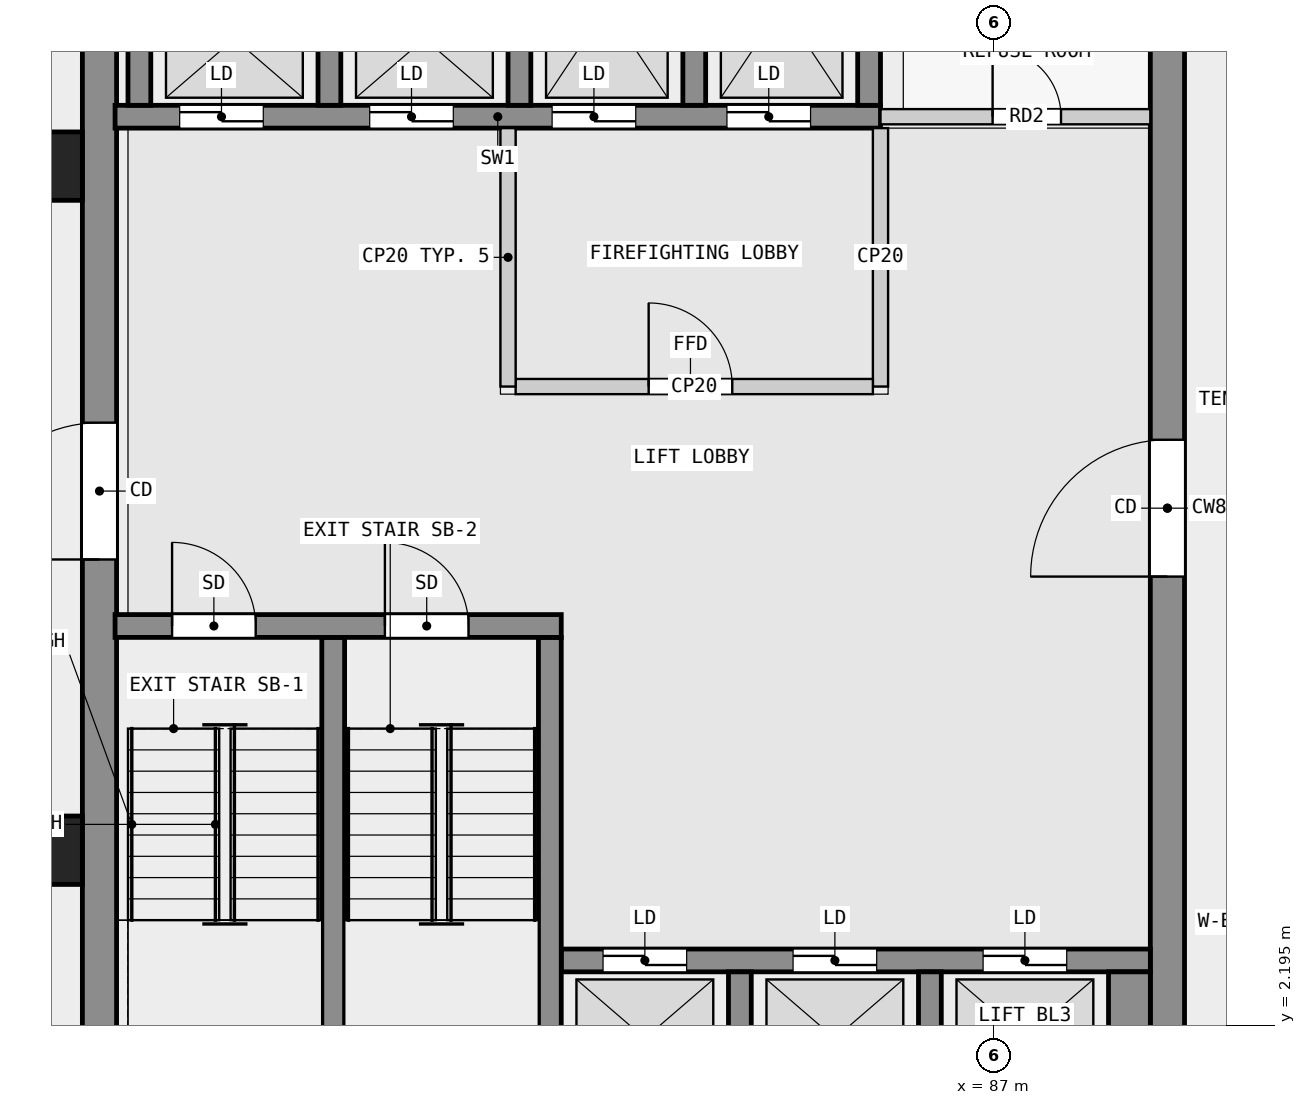
"""IFC4 building model, lengths in metres.
Left out: names, types, materials, properties, quantities, classifications, styles, units other than length and angle.
Written with IfcOpenShell. Run it as: python <this file> out.ifc"""

import sys

from ifc_helpers import new_model, si_unit, direction, frame, frame_2d, origin, origin_2d, place, context, subcontext, project, spatial, rectangle, extrude, element, fill, save


model = new_model("IFC4")
c1 = context("Model", 3, precision=1e-05, world=origin(), true_north=direction((0.0, 1.0)))
c2 = subcontext(c1, "Body", "Model", "MODEL_VIEW")
j1 = project(units=[si_unit("LENGTHUNIT", "METRE"), si_unit("PLANEANGLEUNIT", "RADIAN")], contexts=[c1])
p1 = place(None, origin())
s1 = spatial("IfcSite", under=j1, at=p1, CompositionType="ELEMENT")
p2 = place(p1, origin())
s2 = spatial("IfcBuilding", under=s1, at=p2, CompositionType="ELEMENT")
p3 = place(p2, frame((0.0, 0.0, 88.8)))
s3 = spatial("IfcBuildingStorey", under=s2, at=p3, CompositionType="ELEMENT", Elevation=88.8)
for number, where, z_axis, x_axis in (
    (1, (74.55, 13.5, 0.0), (0.0, 0.0, 1.0), (1.0, 0.0, 0.0)),
    (2, (74.55, 4.5, 0.0), (0.0, 0.0, 1.0), (1.0, 0.0, 0.0)),
):
    element("IfcColumn", number, at=place(p3, frame(where, z_axis=z_axis, x_axis=x_axis)), inside=s3, PredefinedType="COLUMN", context=c2, shape_type="SweptSolid", body=[
        extrude(rectangle(XDim=0.9, YDim=0.9, at=origin_2d()), origin(), (0.0, 0.0, 1.0), 3.5),
    ])
p4 = place(p3, frame((75.225, 0.45, 0.0), z_axis=(0.0, 0.0, 1.0), x_axis=(0.0, 1.0, 0.0)))
e3 = element("IfcWall", 3, at=p4, inside=s3, PredefinedType="SHEAR", context=c2, shape_type="SweptSolid", body=[
    extrude(rectangle(XDim=17.1, YDim=0.45, at=frame_2d((8.55, 0.0))), origin(), (0.0, 0.0, 1.0), 3.25),
])
p5 = place(p4, frame((7.875, 0.0, 0.0)))
e4 = element("IfcOpeningElement", 4, at=p5, cuts=e3, PredefinedType="OPENING", context=c2, shape_type="SweptSolid", body=[
    extrude(rectangle(XDim=1.8, YDim=2.1, at=frame_2d((0.9, 1.05))), frame((0.0, 0.235, 0.0), z_axis=(0.0, -1.0, 0.0), x_axis=(1.0, 0.0, 0.0)), (0.0, 0.0, 1.0), 0.47),
])
p6 = place(p3, frame((89.275, 0.45, 0.0), z_axis=(0.0, 0.0, 1.0), x_axis=(0.0, 1.0, 0.0)))
e5 = element("IfcWall", 5, at=p6, inside=s3, PredefinedType="SHEAR", context=c2, shape_type="SweptSolid", body=[
    extrude(rectangle(XDim=17.1, YDim=0.45, at=frame_2d((8.55, 0.0))), origin(), (0.0, 0.0, 1.0), 3.25),
])
p7 = place(p6, frame((7.65, 0.0, 0.0)))
e6 = element("IfcOpeningElement", 6, at=p7, cuts=e5, PredefinedType="OPENING", context=c2, shape_type="SweptSolid", body=[
    extrude(rectangle(XDim=1.8, YDim=2.1, at=frame_2d((0.9, 1.05))), frame((0.0, 0.235, 0.0), z_axis=(0.0, -1.0, 0.0), x_axis=(1.0, 0.0, 0.0)), (0.0, 0.0, 1.0), 0.47),
])
p8 = place(p6, frame((15.85, 0.0, 0.0)))
e7 = element("IfcOpeningElement", 7, at=p8, cuts=e5, PredefinedType="OPENING", context=c2, shape_type="SweptSolid", body=[
    extrude(rectangle(XDim=0.9, YDim=2.1, at=frame_2d((0.45, 1.05))), frame((0.0, 0.235, 0.0), z_axis=(0.0, -1.0, 0.0), x_axis=(1.0, 0.0, 0.0)), (0.0, 0.0, 1.0), 0.47),
])
p9 = place(p3, frame((75.43, 7.45, 0.0), z_axis=(0.0, 0.0, 1.0), x_axis=(1.0, 0.0, 0.0)))
e8 = element("IfcWall", 8, at=p9, inside=s3, PredefinedType="SHEAR", context=c2, shape_type="SweptSolid", body=[
    extrude(rectangle(XDim=5.87, YDim=0.3, at=frame_2d((2.935, 0.0))), origin(), (0.0, 0.0, 1.0), 3.25),
])
p10 = place(p9, frame((0.75, 0.0, 0.0)))
e9 = element("IfcOpeningElement", 9, at=p10, cuts=e8, PredefinedType="OPENING", context=c2, shape_type="SweptSolid", body=[
    extrude(rectangle(XDim=1.1, YDim=2.1, at=frame_2d((0.55, 1.05))), frame((0.0, 0.16, 0.0), z_axis=(0.0, -1.0, 0.0), x_axis=(1.0, 0.0, 0.0)), (0.0, 0.0, 1.0), 0.32),
])
p11 = place(p9, frame((3.55, 0.0, 0.0)))
e10 = element("IfcOpeningElement", 10, at=p11, cuts=e8, PredefinedType="OPENING", context=c2, shape_type="SweptSolid", body=[
    extrude(rectangle(XDim=1.1, YDim=2.1, at=frame_2d((0.55, 1.05))), frame((0.0, 0.16, 0.0), z_axis=(0.0, -1.0, 0.0), x_axis=(1.0, 0.0, 0.0)), (0.0, 0.0, 1.0), 0.32),
])
for number, where, z_axis, x_axis in (
    (11, (78.3, 0.9, 0.0), (0.0, 0.0, 1.0), (0.0, 1.0, 0.0)),
    (12, (81.15, 0.9, 0.0), (0.0, 0.0, 1.0), (0.0, 1.0, 0.0)),
):
    element("IfcWall", number, at=place(p3, frame(where, z_axis=z_axis, x_axis=x_axis)), inside=s3, PredefinedType="SHEAR", context=c2, shape_type="SweptSolid", body=[
        extrude(rectangle(XDim=6.4, YDim=0.3, at=frame_2d((3.2, 0.0))), origin(), (0.0, 0.0, 1.0), 3.25),
    ])
for number, where, z_axis, x_axis in (
    (13, (83.65, 0.9, 0.0), (0.0, 0.0, 1.0), (0.0, 1.0, 0.0)),
    (14, (86.15, 0.9, 0.0), (0.0, 0.0, 1.0), (0.0, 1.0, 0.0)),
):
    element("IfcWall", number, at=place(p3, frame(where, z_axis=z_axis, x_axis=x_axis)), inside=s3, PredefinedType="SHEAR", context=c2, shape_type="SweptSolid", body=[
        extrude(rectangle(XDim=2.0, YDim=0.3, at=frame_2d((1.0, 0.0))), origin(), (0.0, 0.0, 1.0), 3.25),
    ])
p12 = place(p3, frame((88.775, 0.9, 0.0), z_axis=(0.0, 0.0, 1.0), x_axis=(0.0, 1.0, 0.0)))
e15 = element("IfcWall", 15, at=p12, inside=s3, PredefinedType="SHEAR", context=c2, shape_type="SweptSolid", body=[
    extrude(rectangle(XDim=2.0, YDim=0.55, at=frame_2d((1.0, 0.0))), origin(), (0.0, 0.0, 1.0), 3.25),
])
p13 = place(p3, frame((81.3, 3.05, 0.0), z_axis=(0.0, 0.0, 1.0), x_axis=(1.0, 0.0, 0.0)))
e16 = element("IfcWall", 16, at=p13, inside=s3, PredefinedType="SHEAR", context=c2, shape_type="SweptSolid", body=[
    extrude(rectangle(XDim=7.75, YDim=0.3, at=frame_2d((3.875, 0.0))), origin(), (0.0, 0.0, 1.0), 3.25),
])
p14 = place(p13, frame((0.55, 0.0, 0.0)))
e17 = element("IfcOpeningElement", 17, at=p14, cuts=e16, PredefinedType="OPENING", context=c2, shape_type="SweptSolid", body=[
    extrude(rectangle(XDim=1.1, YDim=2.1, at=frame_2d((0.55, 1.05))), frame((0.0, 0.16, 0.0), z_axis=(0.0, -1.0, 0.0), x_axis=(1.0, 0.0, 0.0)), (0.0, 0.0, 1.0), 0.32),
])
p15 = place(p13, frame((3.05, 0.0, 0.0)))
e18 = element("IfcOpeningElement", 18, at=p15, cuts=e16, PredefinedType="OPENING", context=c2, shape_type="SweptSolid", body=[
    extrude(rectangle(XDim=1.1, YDim=2.1, at=frame_2d((0.55, 1.05))), frame((0.0, 0.16, 0.0), z_axis=(0.0, -1.0, 0.0), x_axis=(1.0, 0.0, 0.0)), (0.0, 0.0, 1.0), 0.32),
])
p16 = place(p13, frame((5.55, 0.0, 0.0)))
e19 = element("IfcOpeningElement", 19, at=p16, cuts=e16, PredefinedType="OPENING", context=c2, shape_type="SweptSolid", body=[
    extrude(rectangle(XDim=1.1, YDim=2.1, at=frame_2d((0.55, 1.05))), frame((0.0, 0.16, 0.0), z_axis=(0.0, -1.0, 0.0), x_axis=(1.0, 0.0, 0.0)), (0.0, 0.0, 1.0), 0.32),
])
p17 = place(p3, frame((75.43, 14.15, 0.0), z_axis=(0.0, 0.0, 1.0), x_axis=(1.0, 0.0, 0.0)))
e20 = element("IfcWall", 20, at=p17, inside=s3, PredefinedType="SHEAR", context=c2, shape_type="SweptSolid", body=[
    extrude(rectangle(XDim=10.07, YDim=0.3, at=frame_2d((5.035, 0.0))), origin(), (0.0, 0.0, 1.0), 3.25),
])
p18 = place(p17, frame((0.85, 0.0, 0.0)))
e21 = element("IfcOpeningElement", 21, at=p18, cuts=e20, PredefinedType="OPENING", context=c2, shape_type="SweptSolid", body=[
    extrude(rectangle(XDim=1.1, YDim=2.1, at=frame_2d((0.55, 1.05))), frame((0.0, 0.16, 0.0), z_axis=(0.0, -1.0, 0.0), x_axis=(1.0, 0.0, 0.0)), (0.0, 0.0, 1.0), 0.32),
])
p19 = place(p17, frame((3.35, 0.0, 0.0)))
e22 = element("IfcOpeningElement", 22, at=p19, cuts=e20, PredefinedType="OPENING", context=c2, shape_type="SweptSolid", body=[
    extrude(rectangle(XDim=1.1, YDim=2.1, at=frame_2d((0.55, 1.05))), frame((0.0, 0.16, 0.0), z_axis=(0.0, -1.0, 0.0), x_axis=(1.0, 0.0, 0.0)), (0.0, 0.0, 1.0), 0.32),
])
p20 = place(p17, frame((5.75, 0.0, 0.0)))
e23 = element("IfcOpeningElement", 23, at=p20, cuts=e20, PredefinedType="OPENING", context=c2, shape_type="SweptSolid", body=[
    extrude(rectangle(XDim=1.1, YDim=2.1, at=frame_2d((0.55, 1.05))), frame((0.0, 0.16, 0.0), z_axis=(0.0, -1.0, 0.0), x_axis=(1.0, 0.0, 0.0)), (0.0, 0.0, 1.0), 0.32),
])
p21 = place(p17, frame((8.05, 0.0, 0.0)))
e24 = element("IfcOpeningElement", 24, at=p21, cuts=e20, PredefinedType="OPENING", context=c2, shape_type="SweptSolid", body=[
    extrude(rectangle(XDim=1.1, YDim=2.1, at=frame_2d((0.55, 1.05))), frame((0.0, 0.16, 0.0), z_axis=(0.0, -1.0, 0.0), x_axis=(1.0, 0.0, 0.0)), (0.0, 0.0, 1.0), 0.32),
])
for number, where, z_axis, x_axis in (
    (25, (75.75, 14.3, 0.0), (0.0, 0.0, 1.0), (0.0, 1.0, 0.0)),
    (26, (78.25, 14.3, 0.0), (0.0, 0.0, 1.0), (0.0, 1.0, 0.0)),
    (27, (80.75, 14.3, 0.0), (0.0, 0.0, 1.0), (0.0, 1.0, 0.0)),
    (28, (83.05, 14.3, 0.0), (0.0, 0.0, 1.0), (0.0, 1.0, 0.0)),
    (29, (85.35, 14.3, 0.0), (0.0, 0.0, 1.0), (0.0, 1.0, 0.0)),
):
    element("IfcWall", number, at=place(p3, frame(where, z_axis=z_axis, x_axis=x_axis)), inside=s3, PredefinedType="SHEAR", context=c2, shape_type="SweptSolid", body=[
        extrude(rectangle(XDim=2.8, YDim=0.3, at=frame_2d((1.4, 0.0))), origin(), (0.0, 0.0, 1.0), 3.25),
    ])
p22 = place(p3, frame((80.6, 10.6, 0.0), z_axis=(0.0, 0.0, 1.0), x_axis=(0.0, 1.0, 0.0)))
e30 = element("IfcWall", 30, at=p22, inside=s3, PredefinedType="PARTITIONING", context=c2, shape_type="SweptSolid", body=[
    extrude(rectangle(XDim=3.4, YDim=0.2, at=frame_2d((1.7, 0.0))), origin(), (0.0, 0.0, 1.0), 3.25),
])
p23 = place(p3, frame((80.7, 10.6, 0.0), z_axis=(0.0, 0.0, 1.0), x_axis=(1.0, 0.0, 0.0)))
e31 = element("IfcWall", 31, at=p23, inside=s3, PredefinedType="PARTITIONING", context=c2, shape_type="SweptSolid", body=[
    extrude(rectangle(XDim=4.7, YDim=0.2, at=frame_2d((2.35, 0.0))), origin(), (0.0, 0.0, 1.0), 3.25),
])
p24 = place(p23, frame((1.75, 0.0, 0.0)))
e32 = element("IfcOpeningElement", 32, at=p24, cuts=e31, PredefinedType="OPENING", context=c2, shape_type="SweptSolid", body=[
    extrude(rectangle(XDim=1.1, YDim=2.1, at=frame_2d((0.55, 1.05))), frame((0.0, 0.11, 0.0), z_axis=(0.0, -1.0, 0.0), x_axis=(1.0, 0.0, 0.0)), (0.0, 0.0, 1.0), 0.22),
])
p25 = place(p3, frame((85.5, 10.6, 0.0), z_axis=(0.0, 0.0, 1.0), x_axis=(0.0, 1.0, 0.0)))
e33 = element("IfcWall", 33, at=p25, inside=s3, PredefinedType="PARTITIONING", context=c2, shape_type="SweptSolid", body=[
    extrude(rectangle(XDim=3.4, YDim=0.2, at=frame_2d((1.7, 0.0))), origin(), (0.0, 0.0, 1.0), 3.25),
])
p26 = place(p3, frame((85.5, 14.15, 0.0), z_axis=(0.0, 0.0, 1.0), x_axis=(1.0, 0.0, 0.0)))
e34 = element("IfcWall", 34, at=p26, inside=s3, PredefinedType="PARTITIONING", context=c2, shape_type="SweptSolid", body=[
    extrude(rectangle(XDim=3.55, YDim=0.2, at=frame_2d((1.775, 0.0))), origin(), (0.0, 0.0, 1.0), 3.25),
])
p27 = place(p26, frame((1.475, 0.0, 0.0)))
e35 = element("IfcOpeningElement", 35, at=p27, cuts=e34, PredefinedType="OPENING", context=c2, shape_type="SweptSolid", body=[
    extrude(rectangle(XDim=0.9, YDim=2.1, at=frame_2d((0.45, 1.05))), frame((0.0, 0.11, 0.0), z_axis=(0.0, -1.0, 0.0), x_axis=(1.0, 0.0, 0.0)), (0.0, 0.0, 1.0), 0.22),
])
p28 = place(p24, origin())
e36 = element("IfcDoor", 36, at=p28, inside=s3, OperationType="SINGLE_SWING_LEFT", PredefinedType="DOOR", context=c2, shape_type="SweptSolid", body=[
    extrude(rectangle(XDim=1.1, YDim=2.1, at=frame_2d((0.55, 1.05))), frame((0.0, 0.025, 0.0), z_axis=(0.0, -1.0, 0.0), x_axis=(1.0, 0.0, 0.0)), (0.0, 0.0, 1.0), 0.05),
])
fill(e32, e36)
p29 = place(p14, origin())
e37 = element("IfcDoor", 37, at=p29, inside=s3, OperationType="DOUBLE_DOOR_SLIDING", PredefinedType="DOOR", context=c2, shape_type="SweptSolid", body=[
    extrude(rectangle(XDim=1.1, YDim=2.1, at=frame_2d((0.55, 1.05))), frame((0.0, 0.025, 0.0), z_axis=(0.0, -1.0, 0.0), x_axis=(1.0, 0.0, 0.0)), (0.0, 0.0, 1.0), 0.05),
])
fill(e17, e37)
p30 = place(p15, origin())
e38 = element("IfcDoor", 38, at=p30, inside=s3, OperationType="DOUBLE_DOOR_SLIDING", PredefinedType="DOOR", context=c2, shape_type="SweptSolid", body=[
    extrude(rectangle(XDim=1.1, YDim=2.1, at=frame_2d((0.55, 1.05))), frame((0.0, 0.025, 0.0), z_axis=(0.0, -1.0, 0.0), x_axis=(1.0, 0.0, 0.0)), (0.0, 0.0, 1.0), 0.05),
])
fill(e18, e38)
p31 = place(p16, origin())
e39 = element("IfcDoor", 39, at=p31, inside=s3, OperationType="DOUBLE_DOOR_SLIDING", PredefinedType="DOOR", context=c2, shape_type="SweptSolid", body=[
    extrude(rectangle(XDim=1.1, YDim=2.1, at=frame_2d((0.55, 1.05))), frame((0.0, 0.025, 0.0), z_axis=(0.0, -1.0, 0.0), x_axis=(1.0, 0.0, 0.0)), (0.0, 0.0, 1.0), 0.05),
])
fill(e19, e39)
p32 = place(p18, origin())
e40 = element("IfcDoor", 40, at=p32, inside=s3, OperationType="DOUBLE_DOOR_SLIDING", PredefinedType="DOOR", context=c2, shape_type="SweptSolid", body=[
    extrude(rectangle(XDim=1.1, YDim=2.1, at=frame_2d((0.55, 1.05))), frame((0.0, 0.025, 0.0), z_axis=(0.0, -1.0, 0.0), x_axis=(1.0, 0.0, 0.0)), (0.0, 0.0, 1.0), 0.05),
])
fill(e21, e40)
p33 = place(p19, origin())
e41 = element("IfcDoor", 41, at=p33, inside=s3, OperationType="DOUBLE_DOOR_SLIDING", PredefinedType="DOOR", context=c2, shape_type="SweptSolid", body=[
    extrude(rectangle(XDim=1.1, YDim=2.1, at=frame_2d((0.55, 1.05))), frame((0.0, 0.025, 0.0), z_axis=(0.0, -1.0, 0.0), x_axis=(1.0, 0.0, 0.0)), (0.0, 0.0, 1.0), 0.05),
])
fill(e22, e41)
p34 = place(p20, origin())
e42 = element("IfcDoor", 42, at=p34, inside=s3, OperationType="DOUBLE_DOOR_SLIDING", PredefinedType="DOOR", context=c2, shape_type="SweptSolid", body=[
    extrude(rectangle(XDim=1.1, YDim=2.1, at=frame_2d((0.55, 1.05))), frame((0.0, 0.025, 0.0), z_axis=(0.0, -1.0, 0.0), x_axis=(1.0, 0.0, 0.0)), (0.0, 0.0, 1.0), 0.05),
])
fill(e23, e42)
p35 = place(p21, origin())
e43 = element("IfcDoor", 43, at=p35, inside=s3, OperationType="DOUBLE_DOOR_SLIDING", PredefinedType="DOOR", context=c2, shape_type="SweptSolid", body=[
    extrude(rectangle(XDim=1.1, YDim=2.1, at=frame_2d((0.55, 1.05))), frame((0.0, 0.025, 0.0), z_axis=(0.0, -1.0, 0.0), x_axis=(1.0, 0.0, 0.0)), (0.0, 0.0, 1.0), 0.05),
])
fill(e24, e43)
p36 = place(p10, origin())
e44 = element("IfcDoor", 44, at=p36, inside=s3, OperationType="SINGLE_SWING_RIGHT", PredefinedType="DOOR", context=c2, shape_type="SweptSolid", body=[
    extrude(rectangle(XDim=1.1, YDim=2.1, at=frame_2d((0.55, 1.05))), frame((0.0, 0.025, 0.0), z_axis=(0.0, -1.0, 0.0), x_axis=(1.0, 0.0, 0.0)), (0.0, 0.0, 1.0), 0.05),
])
fill(e9, e44)
p37 = place(p11, origin())
e45 = element("IfcDoor", 45, at=p37, inside=s3, OperationType="SINGLE_SWING_LEFT", PredefinedType="DOOR", context=c2, shape_type="SweptSolid", body=[
    extrude(rectangle(XDim=1.1, YDim=2.1, at=frame_2d((0.55, 1.05))), frame((0.0, 0.025, 0.0), z_axis=(0.0, -1.0, 0.0), x_axis=(1.0, 0.0, 0.0)), (0.0, 0.0, 1.0), 0.05),
])
fill(e10, e45)
p38 = place(p5, origin())
e46 = element("IfcDoor", 46, at=p38, inside=s3, OperationType="DOUBLE_DOOR_SINGLE_SWING", PredefinedType="DOOR", context=c2, shape_type="SweptSolid", body=[
    extrude(rectangle(XDim=1.8, YDim=2.1, at=frame_2d((0.9, 1.05))), frame((0.0, 0.025, 0.0), z_axis=(0.0, -1.0, 0.0), x_axis=(1.0, 0.0, 0.0)), (0.0, 0.0, 1.0), 0.05),
])
fill(e4, e46)
p39 = place(p7, origin())
e47 = element("IfcDoor", 47, at=p39, inside=s3, OperationType="DOUBLE_DOOR_SINGLE_SWING", PredefinedType="DOOR", context=c2, shape_type="SweptSolid", body=[
    extrude(rectangle(XDim=1.8, YDim=2.1, at=frame_2d((0.9, 1.05))), frame((0.0, 0.025, 0.0), z_axis=(0.0, -1.0, 0.0), x_axis=(1.0, 0.0, 0.0)), (0.0, 0.0, 1.0), 0.05),
])
fill(e6, e47)
p40 = place(p27, origin())
e48 = element("IfcDoor", 48, at=p40, inside=s3, OperationType="SINGLE_SWING_LEFT", PredefinedType="DOOR", context=c2, shape_type="SweptSolid", body=[
    extrude(rectangle(XDim=0.9, YDim=2.1, at=frame_2d((0.45, 1.05))), frame((0.0, 0.025, 0.0), z_axis=(0.0, -1.0, 0.0), x_axis=(1.0, 0.0, 0.0)), (0.0, 0.0, 1.0), 0.05),
])
fill(e35, e48)
save(model, sys.argv[1])
